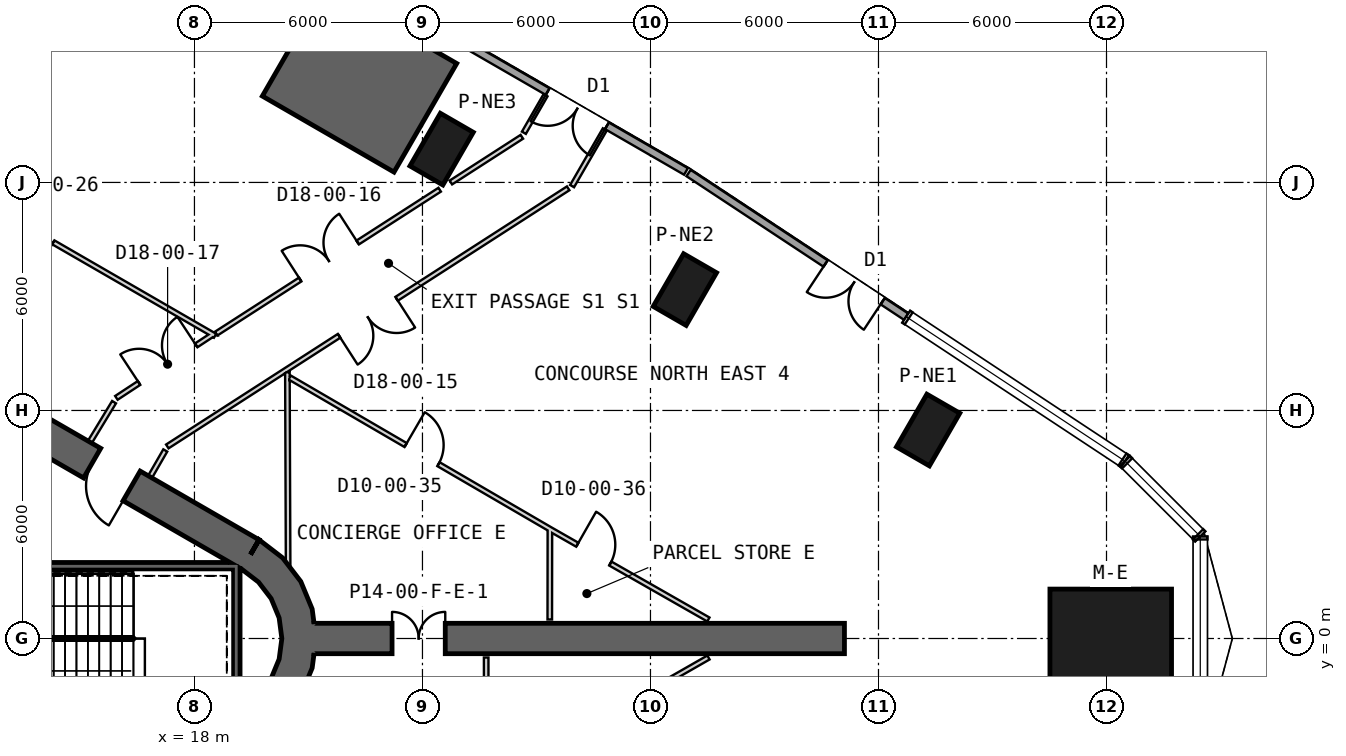
"""IFC4 building model, lengths in metres.
Left out: names, types, materials, properties, quantities, classifications, styles, units other than length and angle.
Written with IfcOpenShell. Run it as: python <this file> out.ifc"""

import sys

from ifc_helpers import new_model, si_unit, direction, frame, frame_2d, origin, origin_2d, place, context, subcontext, project, spatial, polyline, rectangle, outline, extrude, element, fill, save


model = new_model("IFC4")
c1 = context("Model", 3, precision=1e-05, world=origin(), true_north=direction((0.0, 1.0)))
c2 = subcontext(c1, "Body", "Model", "MODEL_VIEW")
j1 = project(units=[si_unit("LENGTHUNIT", "METRE"), si_unit("PLANEANGLEUNIT", "RADIAN")], contexts=[c1])
p1 = place(None, origin())
s1 = spatial("IfcSite", under=j1, at=p1, CompositionType="ELEMENT")
p2 = place(p1, origin())
s2 = spatial("IfcBuilding", under=s1, at=p2, CompositionType="ELEMENT")
p3 = place(p2, origin())
s3 = spatial("IfcBuildingStorey", under=s2, at=p3, CompositionType="ELEMENT", Elevation=0.0)
p4 = place(p3, frame((42.111, 0.0, 0.0), z_axis=(0.0, 0.0, 1.0), x_axis=(1.0, 0.0, 0.0)))
e1 = element("IfcColumn", 1, at=p4, inside=s3, PredefinedType="COLUMN", context=c2, shape_type="SweptSolid", body=[
    extrude(rectangle(XDim=3.2, YDim=2.6, at=origin_2d()), origin(), (0.0, 0.0, 1.0), 9.0),
])
for number, where, z_axis, x_axis in (
    (2, (37.306, 5.485, 0.0), (0.0, 0.0, 1.0), (0.5, 0.866, 0.0)),
    (3, (30.905, 9.181, 0.0), (0.0, 0.0, 1.0), (0.5, 0.866, 0.0)),
    (4, (24.504, 12.876, 0.0), (0.0, 0.0, 1.0), (0.5, 0.866, 0.0)),
):
    element("IfcColumn", number, at=place(p3, frame(where, z_axis=z_axis, x_axis=x_axis)), inside=s3, PredefinedType="COLUMN", context=c2, shape_type="SweptSolid", body=[
        extrude(rectangle(XDim=1.6, YDim=1.0, at=origin_2d()), origin(), (0.0, 0.0, 1.0), 9.0),
    ])
p5 = place(p3, frame((19.475, 2.208, 0.0), z_axis=(0.0, 0.0, 1.0), x_axis=(-0.866028369851, 0.499994862586, 0.0)))
e5 = element("IfcWall", 5, at=p5, inside=s3, PredefinedType="SHEAR", context=c2, shape_type="SweptSolid", body=[
    extrude(rectangle(XDim=31.523, YDim=0.9, at=frame_2d((15.762, 0.0))), origin(), (0.0, 0.0, 1.0), 9.0),
])
p6 = place(p5, frame((7.062, 0.0, 0.0)))
e6 = element("IfcOpeningElement", 6, at=p6, cuts=e5, PredefinedType="OPENING", context=c2, shape_type="SweptSolid", body=[
    extrude(rectangle(XDim=1.2, YDim=2.4, at=frame_2d((0.6, 1.2))), frame((0.0, 0.46, 0.0), z_axis=(0.0, -1.0, 0.0), x_axis=(1.0, 0.0, 0.0)), (0.0, 0.0, 1.0), 0.92),
])
p7 = place(p5, frame((9.762, 0.0, 0.0)))
e7 = element("IfcOpeningElement", 7, at=p7, cuts=e5, PredefinedType="OPENING", context=c2, shape_type="SweptSolid", body=[
    extrude(rectangle(XDim=1.2, YDim=2.4, at=frame_2d((0.6, 1.2))), frame((0.0, 0.46, 0.0), z_axis=(0.0, -1.0, 0.0), x_axis=(1.0, 0.0, 0.0)), (0.0, 0.0, 1.0), 0.92),
])
p8 = place(p5, frame((12.462, 0.0, 0.0)))
e8 = element("IfcOpeningElement", 8, at=p8, cuts=e5, PredefinedType="OPENING", context=c2, shape_type="SweptSolid", body=[
    extrude(rectangle(XDim=1.2, YDim=2.4, at=frame_2d((0.6, 1.2))), frame((0.0, 0.46, 0.0), z_axis=(0.0, -1.0, 0.0), x_axis=(1.0, 0.0, 0.0)), (0.0, 0.0, 1.0), 0.92),
])
p9 = place(p5, frame((15.162, 0.0, 0.0)))
e9 = element("IfcOpeningElement", 9, at=p9, cuts=e5, PredefinedType="OPENING", context=c2, shape_type="SweptSolid", body=[
    extrude(rectangle(XDim=1.2, YDim=2.4, at=frame_2d((0.6, 1.2))), frame((0.0, 0.46, 0.0), z_axis=(0.0, -1.0, 0.0), x_axis=(1.0, 0.0, 0.0)), (0.0, 0.0, 1.0), 0.92),
])
p10 = place(p5, frame((17.862, 0.0, 0.0)))
e10 = element("IfcOpeningElement", 10, at=p10, cuts=e5, PredefinedType="OPENING", context=c2, shape_type="SweptSolid", body=[
    extrude(rectangle(XDim=1.2, YDim=2.4, at=frame_2d((0.6, 1.2))), frame((0.0, 0.46, 0.0), z_axis=(0.0, -1.0, 0.0), x_axis=(1.0, 0.0, 0.0)), (0.0, 0.0, 1.0), 0.92),
])
p11 = place(p5, frame((20.562, 0.0, 0.0)))
e11 = element("IfcOpeningElement", 11, at=p11, cuts=e5, PredefinedType="OPENING", context=c2, shape_type="SweptSolid", body=[
    extrude(rectangle(XDim=1.2, YDim=2.4, at=frame_2d((0.6, 1.2))), frame((0.0, 0.46, 0.0), z_axis=(0.0, -1.0, 0.0), x_axis=(1.0, 0.0, 0.0)), (0.0, 0.0, 1.0), 0.92),
])
p12 = place(p5, frame((23.262, 0.0, 0.0)))
e12 = element("IfcOpeningElement", 12, at=p12, cuts=e5, PredefinedType="OPENING", context=c2, shape_type="SweptSolid", body=[
    extrude(rectangle(XDim=1.2, YDim=2.4, at=frame_2d((0.6, 1.2))), frame((0.0, 0.46, 0.0), z_axis=(0.0, -1.0, 0.0), x_axis=(1.0, 0.0, 0.0)), (0.0, 0.0, 1.0), 0.92),
])
p13 = place(p5, frame((3.612, 0.0, 0.0)))
e13 = element("IfcOpeningElement", 13, at=p13, cuts=e5, PredefinedType="OPENING", context=c2, shape_type="SweptSolid", body=[
    extrude(rectangle(XDim=1.2, YDim=2.4, at=frame_2d((0.6, 1.2))), frame((0.0, 0.46, 0.0), z_axis=(0.0, -1.0, 0.0), x_axis=(1.0, 0.0, 0.0)), (0.0, 0.0, 1.0), 0.92),
])
p14 = place(p5, frame((26.712, 0.0, 0.0)))
e14 = element("IfcOpeningElement", 14, at=p14, cuts=e5, PredefinedType="OPENING", context=c2, shape_type="SweptSolid", body=[
    extrude(rectangle(XDim=1.2, YDim=2.4, at=frame_2d((0.6, 1.2))), frame((0.0, 0.46, 0.0), z_axis=(0.0, -1.0, 0.0), x_axis=(1.0, 0.0, 0.0)), (0.0, 0.0, 1.0), 0.92),
])
p15 = place(p3, origin())
e15 = element("IfcWall", 15, at=p15, inside=s3, PredefinedType="SHEAR", context=c2, shape_type="SweptSolid", body=[
    extrude(outline(polyline([(19.7, -2.598), (20.321, -2.121), (20.798, -1.5), (21.098, -0.777), (21.2, 0.0), (21.098, 0.777), (20.798, 1.5), (20.321, 2.121), (19.7, 2.598), (19.25, 1.819), (19.685, 1.485), (20.019, 1.05), (20.229, 0.543), (20.3, 0.0), (20.229, -0.543), (20.019, -1.05), (19.685, -1.485), (19.25, -1.819), (19.7, -2.598)])), origin(), (0.0, 0.0, 1.0), 9.0),
])
p16 = place(p3, frame((21.15, 0.0, 0.0), z_axis=(0.0, 0.0, 1.0), x_axis=(1.0, 0.0, 0.0)))
e16 = element("IfcWall", 16, at=p16, inside=s3, PredefinedType="SHEAR", context=c2, shape_type="SweptSolid", body=[
    extrude(rectangle(XDim=13.954, YDim=0.8, at=frame_2d((6.977, 0.0))), origin(), (0.0, 0.0, 1.0), 9.0),
])
p17 = place(p16, frame((2.05, 0.0, 0.0)))
e17 = element("IfcOpeningElement", 17, at=p17, cuts=e16, PredefinedType="OPENING", context=c2, shape_type="SweptSolid", body=[
    extrude(rectangle(XDim=1.4, YDim=2.4, at=frame_2d((0.7, 1.2))), frame((0.0, 0.41, 0.0), z_axis=(0.0, -1.0, 0.0), x_axis=(1.0, 0.0, 0.0)), (0.0, 0.0, 1.0), 0.82),
])
p18 = place(p3, origin())
e18 = element("IfcWall", 18, at=p18, inside=s3, PredefinedType="SHEAR", context=c2, shape_type="SweptSolid", body=[
    extrude(outline(polyline([(24.901, 15.13), (21.437, 17.13), (19.787, 14.272), (23.251, 12.272), (24.901, 15.13)])), origin(), (0.0, 0.0, 1.0), 9.0),
])
p19 = place(p3, frame((30.934, 12.289, 0.0), z_axis=(0.0, 0.0, 1.0), x_axis=(-0.866064956285, 0.499931486801, 0.0)))
e19 = element("IfcWall", 19, at=p19, inside=s3, PredefinedType="SOLIDWALL", context=c2, shape_type="SweptSolid", body=[
    extrude(rectangle(XDim=6.605, YDim=0.2, at=frame_2d((3.303, 0.0))), origin(), (0.0, 0.0, 1.0), 8.7),
])
p20 = place(p19, frame((2.403, 0.0, 0.0)))
e20 = element("IfcOpeningElement", 20, at=p20, cuts=e19, PredefinedType="OPENING", context=c2, shape_type="SweptSolid", body=[
    extrude(rectangle(XDim=1.8, YDim=2.4, at=frame_2d((0.9, 1.2))), frame((0.0, 0.11, 0.0), z_axis=(0.0, -1.0, 0.0), x_axis=(1.0, 0.0, 0.0)), (0.0, 0.0, 1.0), 0.22),
])
p21 = place(p3, frame((36.728, 8.468, 0.0), z_axis=(0.0, 0.0, 1.0), x_axis=(-0.834576358251, 0.550892278262, 0.0)))
e21 = element("IfcWall", 21, at=p21, inside=s3, PredefinedType="SOLIDWALL", context=c2, shape_type="SweptSolid", body=[
    extrude(rectangle(XDim=6.861, YDim=0.2, at=frame_2d((3.43, 0.0))), origin(), (0.0, 0.0, 1.0), 8.7),
])
p22 = place(p21, frame((0.74, 0.0, 0.0)))
e22 = element("IfcOpeningElement", 22, at=p22, cuts=e21, PredefinedType="OPENING", context=c2, shape_type="SweptSolid", body=[
    extrude(rectangle(XDim=1.8, YDim=2.4, at=frame_2d((0.9, 1.2))), frame((0.0, 0.11, 0.0), z_axis=(0.0, -1.0, 0.0), x_axis=(1.0, 0.0, 0.0)), (0.0, 0.0, 1.0), 0.22),
])
p23 = place(p3, frame((19.2, 1.9, -0.4), z_axis=(0.0, 0.0, 1.0), x_axis=(-1.0, 0.0, 0.0)))
e23 = element("IfcWall", 23, at=p23, inside=s3, PredefinedType="SHEAR", context=c2, shape_type="SweptSolid", body=[
    extrude(rectangle(XDim=8.1, YDim=0.2, at=frame_2d((4.05, 0.0))), origin(), (0.0, 0.0, 1.0), 9.1),
])
p24 = place(p3, frame((19.1, -2.0, -0.4), z_axis=(0.0, 0.0, 1.0), x_axis=(0.0, 1.0, 0.0)))
e24 = element("IfcWall", 24, at=p24, inside=s3, PredefinedType="SHEAR", context=c2, shape_type="SweptSolid", body=[
    extrude(rectangle(XDim=3.8, YDim=0.2, at=frame_2d((1.9, 0.0))), origin(), (0.0, 0.0, 1.0), 9.1),
])
p25 = place(p3, frame((15.946, 6.331, 0.0), z_axis=(0.0, 0.0, 1.0), x_axis=(0.835422846106, 0.549607740306, 0.0)))
e25 = element("IfcWall", 25, at=p25, inside=s3, PredefinedType="PARTITIONING", context=c2, shape_type="SweptSolid", body=[
    extrude(rectangle(XDim=3.071, YDim=0.12, at=frame_2d((1.535, 0.0))), origin(), (0.0, 0.0, 1.0), 8.7),
])
p26 = place(p25, frame((0.713, 0.0, 0.0)))
e26 = element("IfcOpeningElement", 26, at=p26, cuts=e25, PredefinedType="OPENING", context=c2, shape_type="SweptSolid", body=[
    extrude(rectangle(XDim=1.8, YDim=2.1, at=frame_2d((0.9, 1.05))), frame((0.0, 0.07, 0.0), z_axis=(0.0, -1.0, 0.0), x_axis=(1.0, 0.0, 0.0)), (0.0, 0.0, 1.0), 0.14),
])
p27 = place(p3, frame((15.247, 5.169, 0.0), z_axis=(0.0, 0.0, 1.0), x_axis=(0.51893145636, 0.85481585362, 0.0)))
e27 = element("IfcWall", 27, at=p27, inside=s3, PredefinedType="PARTITIONING", context=c2, shape_type="SweptSolid", body=[
    extrude(rectangle(XDim=1.228, YDim=0.12, at=frame_2d((0.614, 0.0))), origin(), (0.0, 0.0, 1.0), 8.7),
])
p28 = place(p3, frame((18.544, 7.965, 0.0), z_axis=(0.0, 0.0, 1.0), x_axis=(-0.866028877706, 0.499993982943, 0.0)))
e28 = element("IfcWall", 28, at=p28, inside=s3, PredefinedType="PARTITIONING", context=c2, shape_type="SweptSolid", body=[
    extrude(rectangle(XDim=24.154, YDim=0.12, at=frame_2d((12.077, 0.0))), origin(), (0.0, 0.0, 1.0), 8.08),
])
p29 = place(p28, frame((17.517, 0.0, 0.0)))
e29 = element("IfcOpeningElement", 29, at=p29, cuts=e28, PredefinedType="OPENING", context=c2, shape_type="SweptSolid", body=[
    extrude(rectangle(XDim=1.8, YDim=2.1, at=frame_2d((0.9, 1.05))), frame((0.0, 0.07, 0.0), z_axis=(0.0, -1.0, 0.0), x_axis=(1.0, 0.0, 0.0)), (0.0, 0.0, 1.0), 0.14),
])
p30 = place(p28, frame((11.117, 0.0, 0.0)))
e30 = element("IfcOpeningElement", 30, at=p30, cuts=e28, PredefinedType="OPENING", context=c2, shape_type="SweptSolid", body=[
    extrude(rectangle(XDim=1.8, YDim=2.1, at=frame_2d((0.9, 1.05))), frame((0.0, 0.07, 0.0), z_axis=(0.0, -1.0, 0.0), x_axis=(1.0, 0.0, 0.0)), (0.0, 0.0, 1.0), 0.14),
])
p31 = place(p28, frame((4.917, 0.0, 0.0)))
e31 = element("IfcOpeningElement", 31, at=p31, cuts=e28, PredefinedType="OPENING", context=c2, shape_type="SweptSolid", body=[
    extrude(rectangle(XDim=1.8, YDim=2.1, at=frame_2d((0.9, 1.05))), frame((0.0, 0.07, 0.0), z_axis=(0.0, -1.0, 0.0), x_axis=(1.0, 0.0, 0.0)), (0.0, 0.0, 1.0), 0.14),
])
p32 = place(p3, frame((25.68, -3.88, 0.0), z_axis=(0.0, 0.0, 1.0), x_axis=(-0.001011267902, 0.999999488668, 0.0)))
e32 = element("IfcWall", 32, at=p32, inside=s3, PredefinedType="PARTITIONING", context=c2, shape_type="SweptSolid", body=[
    extrude(rectangle(XDim=3.38, YDim=0.12, at=frame_2d((1.69, 0.0))), origin(), (0.0, 0.0, 1.0), 7.78),
])
p33 = place(p3, frame((31.526, -0.5, 0.0), z_axis=(0.0, 0.0, 1.0), x_axis=(-0.867958459522, -0.49663680144, 0.0)))
e33 = element("IfcWall", 33, at=p33, inside=s3, PredefinedType="PARTITIONING", context=c2, shape_type="SweptSolid", body=[
    extrude(rectangle(XDim=6.706, YDim=0.12, at=frame_2d((3.353, 0.0))), origin(), (0.0, 0.0, 1.0), 7.78),
])
p34 = place(p33, frame((2.993, 0.0, 0.0)))
e34 = element("IfcOpeningElement", 34, at=p34, cuts=e33, PredefinedType="OPENING", context=c2, shape_type="SweptSolid", body=[
    extrude(rectangle(XDim=1.0, YDim=2.1, at=frame_2d((0.5, 1.05))), frame((0.0, 0.07, 0.0), z_axis=(0.0, -1.0, 0.0), x_axis=(1.0, 0.0, 0.0)), (0.0, 0.0, 1.0), 0.14),
])
p35 = place(p3, frame((27.35, 0.5, 0.0), z_axis=(0.0, 0.0, 1.0), x_axis=(0.001416142622, 0.99999899727, 0.0)))
e35 = element("IfcWall", 35, at=p35, inside=s3, PredefinedType="PARTITIONING", context=c2, shape_type="SweptSolid", body=[
    extrude(rectangle(XDim=2.414, YDim=0.12, at=frame_2d((1.207, 0.0))), origin(), (0.0, 0.0, 1.0), 8.7),
])
p36 = place(p3, frame((20.446, 7.006, 0.0), z_axis=(0.0, 0.0, 1.0), x_axis=(0.003746504696, -0.999992981827, 0.0)))
e36 = element("IfcWall", 36, at=p36, inside=s3, PredefinedType="PARTITIONING", context=c2, shape_type="SweptSolid", body=[
    extrude(rectangle(XDim=5.278, YDim=0.12, at=frame_2d((2.639, 0.0))), origin(), (0.0, 0.0, 1.0), 7.78),
])
p37 = place(p3, frame((20.506, 6.866, 0.0), z_axis=(0.0, 0.0, 1.0), x_axis=(0.864152740078, -0.503229611425, 0.0)))
e37 = element("IfcWall", 37, at=p37, inside=s3, PredefinedType="PARTITIONING", context=c2, shape_type="SweptSolid", body=[
    extrude(rectangle(XDim=7.954, YDim=0.12, at=frame_2d((3.977, 0.0))), origin(), (0.0, 0.0, 1.0), 7.78),
])
p38 = place(p37, frame((3.531, 0.0, 0.0)))
e38 = element("IfcOpeningElement", 38, at=p38, cuts=e37, PredefinedType="OPENING", context=c2, shape_type="SweptSolid", body=[
    extrude(rectangle(XDim=1.0, YDim=2.1, at=frame_2d((0.5, 1.05))), frame((0.0, 0.07, 0.0), z_axis=(0.0, -1.0, 0.0), x_axis=(1.0, 0.0, 0.0)), (0.0, 0.0, 1.0), 0.14),
])
p39 = place(p3, frame((27.379, 2.864, 0.0), z_axis=(0.0, 0.0, 1.0), x_axis=(0.868605055941, -0.495505052238, 0.0)))
e39 = element("IfcWall", 39, at=p39, inside=s3, PredefinedType="PARTITIONING", context=c2, shape_type="SweptSolid", body=[
    extrude(rectangle(XDim=4.771, YDim=0.12, at=frame_2d((2.385, 0.0))), origin(), (0.0, 0.0, 1.0), 8.7),
])
p40 = place(p39, frame((0.8, 0.0, 0.0)))
e40 = element("IfcOpeningElement", 40, at=p40, cuts=e39, PredefinedType="OPENING", context=c2, shape_type="SweptSolid", body=[
    extrude(rectangle(XDim=1.0, YDim=2.1, at=frame_2d((0.5, 1.05))), frame((0.0, 0.07, 0.0), z_axis=(0.0, -1.0, 0.0), x_axis=(1.0, 0.0, 0.0)), (0.0, 0.0, 1.0), 0.14),
])
p41 = place(p3, frame((26.616, 13.201, 0.0), z_axis=(0.0, 0.0, 1.0), x_axis=(-0.840785549223, -0.541368322141, 0.0)))
e41 = element("IfcWall", 41, at=p41, inside=s3, PredefinedType="PARTITIONING", context=c2, shape_type="SweptSolid", body=[
    extrude(rectangle(XDim=2.222, YDim=0.12, at=frame_2d((1.111, 0.0))), origin(), (0.0, 0.0, 1.0), 8.7),
])
p42 = place(p3, frame((24.453, 11.809, 0.0), z_axis=(0.0, 0.0, 1.0), x_axis=(-0.840794042164, -0.54135513174, 0.0)))
e42 = element("IfcWall", 42, at=p42, inside=s3, PredefinedType="PARTITIONING", context=c2, shape_type="SweptSolid", body=[
    extrude(rectangle(XDim=6.999, YDim=0.12, at=frame_2d((3.5, 0.0))), origin(), (0.0, 0.0, 1.0), 8.7),
])
p43 = place(p42, frame((2.566, 0.0, 0.0)))
e43 = element("IfcOpeningElement", 43, at=p43, cuts=e42, PredefinedType="OPENING", context=c2, shape_type="SweptSolid", body=[
    extrude(rectangle(XDim=1.8, YDim=2.1, at=frame_2d((0.9, 1.05))), frame((0.0, 0.07, 0.0), z_axis=(0.0, -1.0, 0.0), x_axis=(1.0, 0.0, 0.0)), (0.0, 0.0, 1.0), 0.14),
])
p44 = place(p3, frame((26.669, 13.307, 0.0), z_axis=(0.0, 0.0, 1.0), x_axis=(0.499948909352, 0.866054898975, 0.0)))
e44 = element("IfcWall", 44, at=p44, inside=s3, PredefinedType="PARTITIONING", context=c2, shape_type="SweptSolid", body=[
    extrude(rectangle(XDim=1.151, YDim=0.12, at=frame_2d((0.575, 0.0))), origin(), (0.0, 0.0, 1.0), 8.7),
])
p45 = place(p3, frame((27.937, 11.903, 0.0), z_axis=(0.0, 0.0, 1.0), x_axis=(0.499958279983, 0.866049489508, 0.0)))
e45 = element("IfcWall", 45, at=p45, inside=s3, PredefinedType="PARTITIONING", context=c2, shape_type="SweptSolid", body=[
    extrude(rectangle(XDim=1.733, YDim=0.12, at=frame_2d((0.866, 0.0))), origin(), (0.0, 0.0, 1.0), 8.7),
])
p46 = place(p3, frame((17.286, 5.053, 0.0), z_axis=(0.0, 0.0, 1.0), x_axis=(0.840791306929, 0.541359379888, 0.0)))
e46 = element("IfcWall", 46, at=p46, inside=s3, PredefinedType="PARTITIONING", context=c2, shape_type="SweptSolid", body=[
    extrude(rectangle(XDim=12.546, YDim=0.12, at=frame_2d((6.273, 0.0))), origin(), (0.0, 0.0, 1.0), 7.88),
])
p47 = place(p46, frame((5.377, 0.0, 0.0)))
e47 = element("IfcOpeningElement", 47, at=p47, cuts=e46, PredefinedType="OPENING", context=c2, shape_type="SweptSolid", body=[
    extrude(rectangle(XDim=1.8, YDim=2.1, at=frame_2d((0.9, 1.05))), frame((0.0, 0.07, 0.0), z_axis=(0.0, -1.0, 0.0), x_axis=(1.0, 0.0, 0.0)), (0.0, 0.0, 1.0), 0.14),
])
p48 = place(p3, frame((17.232, 4.948, 0.0), z_axis=(0.0, 0.0, 1.0), x_axis=(-0.500120931396, -0.865955572752, 0.0)))
e48 = element("IfcWall", 48, at=p48, inside=s3, PredefinedType="PARTITIONING", context=c2, shape_type="SweptSolid", body=[
    extrude(rectangle(XDim=0.831, YDim=0.12, at=frame_2d((0.416, 0.0))), origin(), (0.0, 0.0, 1.0), 7.88),
])
p49 = place(p20, frame((1.8, 0.0, 0.0), z_axis=(0.0, 0.0, 1.0), x_axis=(-1.0, 0.0, 0.0)))
e49 = element("IfcDoor", 49, at=p49, inside=s3, OperationType="SINGLE_SWING_RIGHT", PredefinedType="DOOR", context=c2, shape_type="SweptSolid", body=[
    extrude(rectangle(XDim=1.8, YDim=2.4, at=frame_2d((0.9, 1.2))), frame((0.0, 0.025, 0.0), z_axis=(0.0, -1.0, 0.0), x_axis=(1.0, 0.0, 0.0)), (0.0, 0.0, 1.0), 0.05),
])
fill(e20, e49)
p50 = place(p22, frame((1.8, 0.0, 0.0), z_axis=(0.0, 0.0, 1.0), x_axis=(-1.0, 0.0, 0.0)))
e50 = element("IfcDoor", 50, at=p50, inside=s3, OperationType="SINGLE_SWING_RIGHT", PredefinedType="DOOR", context=c2, shape_type="SweptSolid", body=[
    extrude(rectangle(XDim=1.8, YDim=2.4, at=frame_2d((0.9, 1.2))), frame((0.0, 0.025, 0.0), z_axis=(0.0, -1.0, 0.0), x_axis=(1.0, 0.0, 0.0)), (0.0, 0.0, 1.0), 0.05),
])
fill(e22, e50)
p51 = place(p47, origin())
e51 = element("IfcDoor", 51, at=p51, inside=s3, OperationType="DOUBLE_DOOR_SINGLE_SWING", PredefinedType="NOTDEFINED", context=c2, shape_type="SweptSolid", body=[
    extrude(rectangle(XDim=1.8, YDim=2.1, at=frame_2d((0.9, 1.05))), frame((0.0, 0.025, 0.0), z_axis=(0.0, -1.0, 0.0), x_axis=(1.0, 0.0, 0.0)), (0.0, 0.0, 1.0), 0.05),
])
fill(e47, e51)
p52 = place(p43, origin())
e52 = element("IfcDoor", 52, at=p52, inside=s3, OperationType="DOUBLE_DOOR_SINGLE_SWING", PredefinedType="NOTDEFINED", context=c2, shape_type="SweptSolid", body=[
    extrude(rectangle(XDim=1.8, YDim=2.1, at=frame_2d((0.9, 1.05))), frame((0.0, 0.025, 0.0), z_axis=(0.0, -1.0, 0.0), x_axis=(1.0, 0.0, 0.0)), (0.0, 0.0, 1.0), 0.05),
])
fill(e43, e52)
p53 = place(p26, origin())
e53 = element("IfcDoor", 53, at=p53, inside=s3, OperationType="DOUBLE_DOOR_SINGLE_SWING", PredefinedType="NOTDEFINED", context=c2, shape_type="SweptSolid", body=[
    extrude(rectangle(XDim=1.8, YDim=2.1, at=frame_2d((0.9, 1.05))), frame((0.0, 0.025, 0.0), z_axis=(0.0, -1.0, 0.0), x_axis=(1.0, 0.0, 0.0)), (0.0, 0.0, 1.0), 0.05),
])
fill(e26, e53)
p54 = place(p31, origin())
e54 = element("IfcDoor", 54, at=p54, inside=s3, OperationType="DOUBLE_DOOR_SINGLE_SWING", PredefinedType="NOTDEFINED", context=c2, shape_type="SweptSolid", body=[
    extrude(rectangle(XDim=1.8, YDim=2.1, at=frame_2d((0.9, 1.05))), frame((0.0, 0.025, 0.0), z_axis=(0.0, -1.0, 0.0), x_axis=(1.0, 0.0, 0.0)), (0.0, 0.0, 1.0), 0.05),
])
fill(e31, e54)
p55 = place(p38, origin())
e55 = element("IfcDoor", 55, at=p55, inside=s3, OperationType="SINGLE_SWING_LEFT", PredefinedType="NOTDEFINED", context=c2, shape_type="SweptSolid", body=[
    extrude(rectangle(XDim=1.0, YDim=2.1, at=frame_2d((0.5, 1.05))), frame((0.0, 0.025, 0.0), z_axis=(0.0, -1.0, 0.0), x_axis=(1.0, 0.0, 0.0)), (0.0, 0.0, 1.0), 0.05),
])
fill(e38, e55)
p56 = place(p40, origin())
e56 = element("IfcDoor", 56, at=p56, inside=s3, OperationType="SINGLE_SWING_LEFT", PredefinedType="NOTDEFINED", context=c2, shape_type="SweptSolid", body=[
    extrude(rectangle(XDim=1.0, YDim=2.1, at=frame_2d((0.5, 1.05))), frame((0.0, 0.025, 0.0), z_axis=(0.0, -1.0, 0.0), x_axis=(1.0, 0.0, 0.0)), (0.0, 0.0, 1.0), 0.05),
])
fill(e40, e56)
p57 = place(p13, origin())
e57 = element("IfcDoor", 57, at=p57, inside=s3, OperationType="SINGLE_SWING_LEFT", PredefinedType="USERDEFINED", context=c2, shape_type="SweptSolid", body=[
    extrude(rectangle(XDim=1.2, YDim=2.4, at=frame_2d((0.6, 1.2))), frame((0.0, 0.025, 0.0), z_axis=(0.0, -1.0, 0.0), x_axis=(1.0, 0.0, 0.0)), (0.0, 0.0, 1.0), 0.05),
])
fill(e13, e57)
p58 = place(p17, origin())
e58 = element("IfcDoor", 58, at=p58, inside=s3, OperationType="DOUBLE_DOOR_SINGLE_SWING", PredefinedType="NOTDEFINED", context=c2, shape_type="SweptSolid", body=[
    extrude(rectangle(XDim=1.4, YDim=2.4, at=frame_2d((0.7, 1.2))), frame((0.0, 0.025, 0.0), z_axis=(0.0, -1.0, 0.0), x_axis=(1.0, 0.0, 0.0)), (0.0, 0.0, 1.0), 0.05),
])
fill(e17, e58)
save(model, sys.argv[1])
